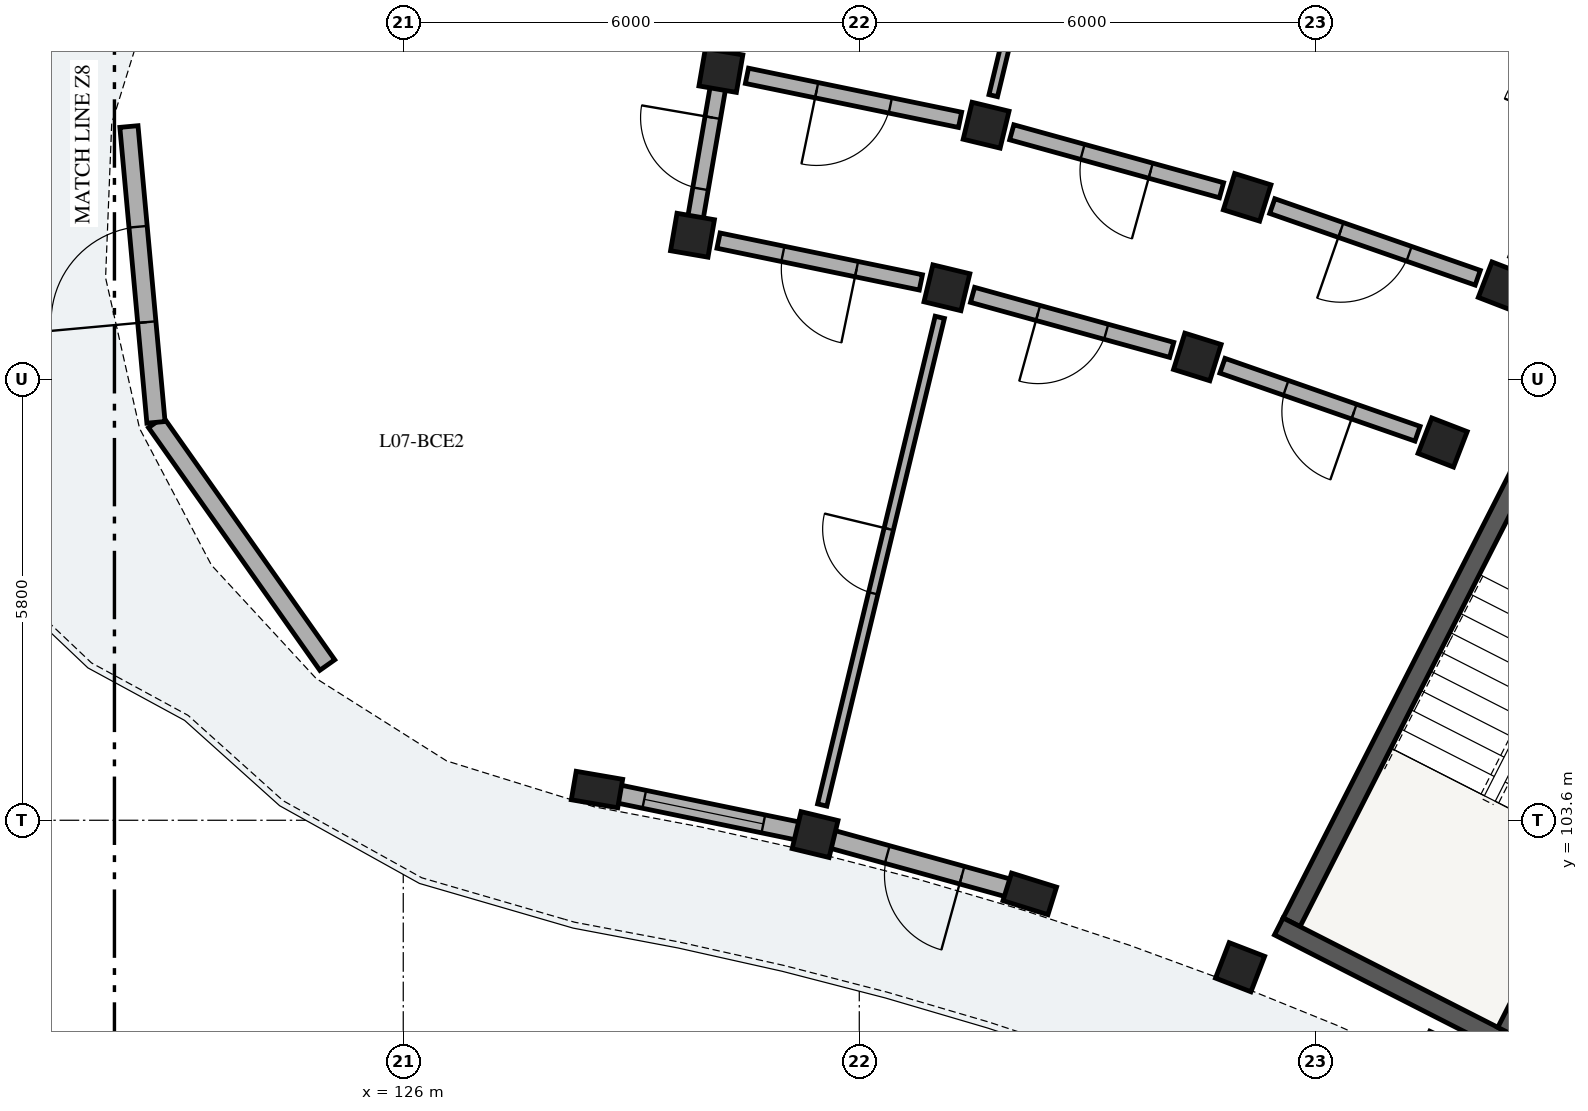
"""IFC4 building model, lengths in metres.
Left out: names, types, materials, properties, quantities, classifications, styles, units other than length and angle.
Written with IfcOpenShell. Run it as: python <this file> out.ifc"""

import sys

from ifc_helpers import new_model, si_unit, direction, frame, frame_2d, origin, origin_2d, place, context, subcontext, project, spatial, rectangle, extrude, element, fill, save


model = new_model("IFC4")
c1 = context("Model", 3, precision=1e-05, world=origin(), true_north=direction((0.0, 1.0)))
c2 = subcontext(c1, "Body", "Model", "MODEL_VIEW")
j1 = project(units=[si_unit("LENGTHUNIT", "METRE"), si_unit("PLANEANGLEUNIT", "RADIAN")], contexts=[c1])
p1 = place(None, origin())
s1 = spatial("IfcSite", under=j1, at=p1, CompositionType="ELEMENT")
p2 = place(p1, origin())
s2 = spatial("IfcBuilding", under=s1, at=p2, CompositionType="ELEMENT")
p3 = place(p2, frame((0.0, 0.0, 25.64)))
s3 = spatial("IfcBuildingStorey", under=s2, at=p3, CompositionType="ELEMENT", Elevation=25.64)
p4 = place(p3, frame((140.684, 108.139, 0.0), z_axis=(0.0, 0.0, 1.0), x_axis=(-0.453992276384, -0.891005618941, 0.0)))
e1 = element("IfcWall", 1, at=p4, inside=s3, PredefinedType="SHEAR", context=c2, shape_type="SweptSolid", body=[
    extrude(rectangle(XDim=6.6, YDim=0.25, at=frame_2d((3.3, 0.0))), origin(), (0.0, 0.0, 1.0), 3.11),
])
p5 = place(p3, frame((137.52, 102.203, 0.0), z_axis=(0.0, 0.0, 1.0), x_axis=(0.891003540237, -0.453996356025, 0.0)))
e2 = element("IfcWall", 2, at=p5, inside=s3, PredefinedType="SHEAR", context=c2, shape_type="SweptSolid", body=[
    extrude(rectangle(XDim=3.42, YDim=0.25, at=frame_2d((1.71, 0.0))), origin(), (0.0, 0.0, 1.0), 3.11),
])
p6 = place(p3, frame((143.509, 106.699, 0.0), z_axis=(0.0, 0.0, 1.0), x_axis=(-0.453992276384, -0.891005618941, 0.0)))
e3 = element("IfcWall", 3, at=p6, inside=s3, PredefinedType="SHEAR", context=c2, shape_type="SweptSolid", body=[
    extrude(rectangle(XDim=6.6, YDim=0.25, at=frame_2d((3.3, 0.0))), origin(), (0.0, 0.0, 1.0), 3.11),
])
p7 = place(p6, frame((0.22, 0.0, 0.0)))
e4 = element("IfcOpeningElement", 4, at=p7, cuts=e3, PredefinedType="OPENING", context=c2, shape_type="SweptSolid", body=[
    extrude(rectangle(XDim=1.05, YDim=2.15, at=frame_2d((0.525, 1.075))), frame((0.0, 0.135, 0.0), z_axis=(0.0, -1.0, 0.0), x_axis=(1.0, 0.0, 0.0)), (0.0, 0.0, 1.0), 0.27),
])
for number, where, z_axis, x_axis in (
    (5, (137.01, 101.667, 0.0), (0.0, 0.0, 1.0), (0.36, 0.933, 0.0)),
    (6, (139.675, 108.57, 0.0), (0.0, 0.0, 1.0), (0.36, 0.933, 0.0)),
    (7, (140.468, 110.622, 0.0), (0.0, 0.0, 1.0), (0.36, 0.933, 0.0)),
):
    element("IfcColumn", number, at=place(p3, frame(where, z_axis=z_axis, x_axis=x_axis)), inside=s3, PredefinedType="COLUMN", context=c2, shape_type="SweptSolid", body=[
        extrude(rectangle(XDim=0.5, YDim=0.5, at=origin_2d()), origin(), (0.0, 0.0, 1.0), 3.11),
    ])
p8 = place(p3, frame((134.243, 102.631, 0.0), z_axis=(0.0, 0.0, 1.0), x_axis=(0.297930225503, 0.954587649581, 0.0)))
e8 = element("IfcColumn", 8, at=p8, inside=s3, PredefinedType="PILASTER", context=c2, shape_type="SweptSolid", body=[
    extrude(rectangle(XDim=0.38, YDim=0.62, at=origin_2d()), origin(), (0.0, 0.0, 1.0), 3.11),
])
for number, where, z_axis, x_axis in (
    (9, (136.448, 109.695, 0.0), (0.0, 0.0, 1.0), (0.298, 0.955, 0.0)),
    (10, (137.103, 111.795, 0.0), (0.0, 0.0, 1.0), (0.298, 0.955, 0.0)),
    (11, (131.418, 103.412, 0.0), (0.0, 0.0, 1.0), (0.234, 0.972, 0.0)),
    (12, (133.153, 110.606, 0.0), (0.0, 0.0, 1.0), (0.234, 0.972, 0.0)),
    (13, (133.669, 112.744, 0.0), (0.0, 0.0, 1.0), (0.234, 0.972, 0.0)),
):
    element("IfcColumn", number, at=place(p3, frame(where, z_axis=z_axis, x_axis=x_axis)), inside=s3, PredefinedType="COLUMN", context=c2, shape_type="SweptSolid", body=[
        extrude(rectangle(XDim=0.5, YDim=0.5, at=origin_2d()), origin(), (0.0, 0.0, 1.0), 3.11),
    ])
p9 = place(p3, frame((128.549, 104.004, 0.0), z_axis=(0.0, 0.0, 1.0), x_axis=(0.169827230012, 0.985473851478, 0.0)))
e14 = element("IfcColumn", 14, at=p9, inside=s3, PredefinedType="PILASTER", context=c2, shape_type="SweptSolid", body=[
    extrude(rectangle(XDim=0.38, YDim=0.62, at=origin_2d()), origin(), (0.0, 0.0, 1.0), 3.11),
])
for number, where, z_axis, x_axis in (
    (15, (129.806, 111.297, 0.0), (0.0, 0.0, 1.0), (0.17, 0.985, 0.0)),
    (16, (130.179, 113.465, 0.0), (0.0, 0.0, 1.0), (0.17, 0.985, 0.0)),
):
    element("IfcColumn", number, at=place(p3, frame(where, z_axis=z_axis, x_axis=x_axis)), inside=s3, PredefinedType="COLUMN", context=c2, shape_type="SweptSolid", body=[
        extrude(rectangle(XDim=0.5, YDim=0.5, at=origin_2d()), origin(), (0.0, 0.0, 1.0), 3.11),
    ])
p10 = place(p3, frame((134.089, 102.674, 0.0), z_axis=(0.0, 0.0, 1.0), x_axis=(-0.963885917636, 0.266315485437, 0.0)))
e17 = element("IfcWall", 17, at=p10, inside=s3, PredefinedType="SOLIDWALL", context=c2, shape_type="SweptSolid", body=[
    extrude(rectangle(XDim=2.55, YDim=0.24, at=frame_2d((1.275, 0.0))), origin(), (0.0, 0.0, 1.0), 2.355),
])
p11 = place(p10, frame((0.765, 0.0, 0.0)))
e18 = element("IfcOpeningElement", 18, at=p11, cuts=e17, PredefinedType="OPENING", context=c2, shape_type="SweptSolid", body=[
    extrude(rectangle(XDim=1.02, YDim=2.14, at=frame_2d((0.51, 1.07))), frame((0.0, 0.13, 0.0), z_axis=(0.0, -1.0, 0.0), x_axis=(1.0, 0.0, 0.0)), (0.0, 0.0, 1.0), 0.26),
])
p12 = place(p3, frame((131.203, 103.456, 0.0), z_axis=(0.0, 0.0, 1.0), x_axis=(-0.979346784625, 0.202187723277, 0.0)))
e19 = element("IfcWall", 19, at=p12, inside=s3, PredefinedType="SOLIDWALL", context=c2, shape_type="SweptSolid", body=[
    extrude(rectangle(XDim=2.55, YDim=0.24, at=frame_2d((1.275, 0.0))), origin(), (0.0, 0.0, 1.0), 2.355),
])
p13 = place(p12, frame((0.475, 0.0, 0.55)))
e20 = element("IfcOpeningElement", 20, at=p13, cuts=e19, PredefinedType="OPENING", context=c2, shape_type="SweptSolid", body=[
    extrude(rectangle(XDim=1.6, YDim=1.535, at=frame_2d((0.8, 0.768))), frame((0.0, 0.13, 0.0), z_axis=(0.0, -1.0, 0.0), x_axis=(1.0, 0.0, 0.0)), (0.0, 0.0, 1.0), 0.26),
])
p14 = place(p3, frame((125.0, 105.642, 0.0), z_axis=(0.0, 0.0, 1.0), x_axis=(-0.576773939634, 0.816903802512, 0.0)))
e21 = element("IfcWall", 21, at=p14, inside=s3, PredefinedType="SOLIDWALL", context=c2, shape_type="SweptSolid", body=[
    extrude(rectangle(XDim=3.908, YDim=0.24, at=frame_2d((1.954, 0.0))), origin(), (0.0, 0.0, 1.0), 2.355),
])
p15 = place(p3, frame((122.746, 108.835, 0.0), z_axis=(0.0, 0.0, 1.0), x_axis=(-0.091020141047, 0.995849051776, 0.0)))
e22 = element("IfcWall", 22, at=p15, inside=s3, PredefinedType="SOLIDWALL", context=c2, shape_type="SweptSolid", body=[
    extrude(rectangle(XDim=3.908, YDim=0.24, at=frame_2d((1.954, 0.0))), origin(), (0.0, 0.0, 1.0), 2.355),
])
p16 = place(p15, frame((1.324, 0.0, 0.0)))
e23 = element("IfcOpeningElement", 23, at=p16, cuts=e22, PredefinedType="OPENING", context=c2, shape_type="SweptSolid", body=[
    extrude(rectangle(XDim=1.26, YDim=2.18, at=frame_2d((0.63, 1.09))), frame((0.0, 0.13, 0.0), z_axis=(0.0, -1.0, 0.0), x_axis=(1.0, 0.0, 0.0)), (0.0, 0.0, 1.0), 0.26),
])
p17 = place(p3, frame((140.137, 110.738, 0.0), z_axis=(0.0, 0.0, 1.0), x_axis=(-0.944253820929, 0.329218349522, 0.0)))
e24 = element("IfcWall", 24, at=p17, inside=s3, PredefinedType="PARTITIONING", context=c2, shape_type="SweptSolid", body=[
    extrude(rectangle(XDim=2.863, YDim=0.205, at=frame_2d((1.432, 0.0))), origin(), (0.0, 0.0, 1.0), 2.37),
])
p18 = place(p17, frame((0.957, 0.0, 0.0)))
e25 = element("IfcOpeningElement", 25, at=p18, cuts=e24, PredefinedType="OPENING", context=c2, shape_type="SweptSolid", body=[
    extrude(rectangle(XDim=0.95, YDim=2.13, at=frame_2d((0.475, 1.065))), frame((0.0, 0.113, 0.0), z_axis=(0.0, -1.0, 0.0), x_axis=(1.0, 0.0, 0.0)), (0.0, 0.0, 1.0), 0.225),
])
p19 = place(p3, frame((139.345, 108.685, 0.0), z_axis=(0.0, 0.0, 1.0), x_axis=(-0.944265123647, 0.329185929627, 0.0)))
e26 = element("IfcWall", 26, at=p19, inside=s3, PredefinedType="PARTITIONING", context=c2, shape_type="SweptSolid", body=[
    extrude(rectangle(XDim=2.718, YDim=0.205, at=frame_2d((1.359, 0.0))), origin(), (0.0, 0.0, 1.0), 2.37),
])
p20 = place(p19, frame((0.884, 0.0, 0.0)))
e27 = element("IfcOpeningElement", 27, at=p20, cuts=e26, PredefinedType="OPENING", context=c2, shape_type="SweptSolid", body=[
    extrude(rectangle(XDim=0.95, YDim=2.13, at=frame_2d((0.475, 1.065))), frame((0.0, 0.113, 0.0), z_axis=(0.0, -1.0, 0.0), x_axis=(1.0, 0.0, 0.0)), (0.0, 0.0, 1.0), 0.225),
])
p21 = place(p3, frame((136.766, 111.889, 0.0), z_axis=(0.0, 0.0, 1.0), x_axis=(-0.963890789093, 0.266297853356, 0.0)))
e28 = element("IfcWall", 28, at=p21, inside=s3, PredefinedType="PARTITIONING", context=c2, shape_type="SweptSolid", body=[
    extrude(rectangle(XDim=2.863, YDim=0.205, at=frame_2d((1.432, 0.0))), origin(), (0.0, 0.0, 1.0), 2.37),
])
p22 = place(p21, frame((0.967, 0.0, 0.0)))
e29 = element("IfcOpeningElement", 29, at=p22, cuts=e28, PredefinedType="OPENING", context=c2, shape_type="SweptSolid", body=[
    extrude(rectangle(XDim=0.93, YDim=2.12, at=frame_2d((0.465, 1.06))), frame((0.0, 0.113, 0.0), z_axis=(0.0, -1.0, 0.0), x_axis=(1.0, 0.0, 0.0)), (0.0, 0.0, 1.0), 0.225),
])
p23 = place(p3, frame((136.11, 109.789, 0.0), z_axis=(0.0, 0.0, 1.0), x_axis=(-0.96388375821, 0.266323301006, 0.0)))
e30 = element("IfcWall", 30, at=p23, inside=s3, PredefinedType="PARTITIONING", context=c2, shape_type="SweptSolid", body=[
    extrude(rectangle(XDim=2.718, YDim=0.205, at=frame_2d((1.359, 0.0))), origin(), (0.0, 0.0, 1.0), 2.37),
])
p24 = place(p23, frame((0.894, 0.0, 0.0)))
e31 = element("IfcOpeningElement", 31, at=p24, cuts=e30, PredefinedType="OPENING", context=c2, shape_type="SweptSolid", body=[
    extrude(rectangle(XDim=0.93, YDim=2.12, at=frame_2d((0.465, 1.06))), frame((0.0, 0.113, 0.0), z_axis=(0.0, -1.0, 0.0), x_axis=(1.0, 0.0, 0.0)), (0.0, 0.0, 1.0), 0.225),
])
p25 = place(p3, frame((133.762, 113.133, 0.0), z_axis=(0.0, 0.0, 1.0), x_axis=(0.234386624934, 0.972143461662, 0.0)))
e32 = element("IfcWall", 32, at=p25, inside=s3, PredefinedType="PARTITIONING", context=c2, shape_type="SweptSolid", body=[
    extrude(rectangle(XDim=4.7, YDim=0.115, at=frame_2d((2.35, 0.0))), origin(), (0.0, 0.0, 1.0), 2.37),
])
p26 = place(p25, frame((1.905, 0.0, 0.0)))
e33 = element("IfcOpeningElement", 33, at=p26, cuts=e32, PredefinedType="OPENING", context=c2, shape_type="SweptSolid", body=[
    extrude(rectangle(XDim=0.89, YDim=2.1, at=frame_2d((0.445, 1.05))), frame((0.0, 0.067, 0.0), z_axis=(0.0, -1.0, 0.0), x_axis=(1.0, 0.0, 0.0)), (0.0, 0.0, 1.0), 0.135),
])
p27 = place(p3, frame((131.512, 103.801, 0.0), z_axis=(0.0, 0.0, 1.0), x_axis=(0.234406698576, 0.972138621629, 0.0)))
e34 = element("IfcWall", 34, at=p27, inside=s3, PredefinedType="PARTITIONING", context=c2, shape_type="SweptSolid", body=[
    extrude(rectangle(XDim=6.6, YDim=0.125, at=frame_2d((3.3, 0.0))), origin(), (0.0, 0.0, 1.0), 2.37),
])
p28 = place(p27, frame((2.865, 0.0, 0.0)))
e35 = element("IfcOpeningElement", 35, at=p28, cuts=e34, PredefinedType="OPENING", context=c2, shape_type="SweptSolid", body=[
    extrude(rectangle(XDim=0.87, YDim=2.08, at=frame_2d((0.435, 1.04))), frame((0.0, 0.073, 0.0), z_axis=(0.0, -1.0, 0.0), x_axis=(1.0, 0.0, 0.0)), (0.0, 0.0, 1.0), 0.145),
])
p29 = place(p3, frame((133.326, 112.815, 0.0), z_axis=(0.0, 0.0, 1.0), x_axis=(-0.979348418612, 0.202179808492, 0.0)))
e36 = element("IfcWall", 36, at=p29, inside=s3, PredefinedType="PARTITIONING", context=c2, shape_type="SweptSolid", body=[
    extrude(rectangle(XDim=2.863, YDim=0.205, at=frame_2d((1.432, 0.0))), origin(), (0.0, 0.0, 1.0), 2.37),
])
p30 = place(p29, frame((0.937, 0.0, 0.0)))
e37 = element("IfcOpeningElement", 37, at=p30, cuts=e36, PredefinedType="OPENING", context=c2, shape_type="SweptSolid", body=[
    extrude(rectangle(XDim=0.99, YDim=2.16, at=frame_2d((0.495, 1.08))), frame((0.0, 0.113, 0.0), z_axis=(0.0, -1.0, 0.0), x_axis=(1.0, 0.0, 0.0)), (0.0, 0.0, 1.0), 0.225),
])
p31 = place(p3, frame((132.81, 110.677, 0.0), z_axis=(0.0, 0.0, 1.0), x_axis=(-0.979349423541, 0.202174940608, 0.0)))
e38 = element("IfcWall", 38, at=p31, inside=s3, PredefinedType="PARTITIONING", context=c2, shape_type="SweptSolid", body=[
    extrude(rectangle(XDim=2.718, YDim=0.205, at=frame_2d((1.359, 0.0))), origin(), (0.0, 0.0, 1.0), 2.37),
])
p32 = place(p31, frame((0.864, 0.0, 0.0)))
e39 = element("IfcOpeningElement", 39, at=p32, cuts=e38, PredefinedType="OPENING", context=c2, shape_type="SweptSolid", body=[
    extrude(rectangle(XDim=0.99, YDim=2.16, at=frame_2d((0.495, 1.08))), frame((0.0, 0.113, 0.0), z_axis=(0.0, -1.0, 0.0), x_axis=(1.0, 0.0, 0.0)), (0.0, 0.0, 1.0), 0.225),
])
p33 = place(p3, frame((129.814, 111.346, 0.0), z_axis=(0.0, 0.0, 1.0), x_axis=(0.169864088707, 0.98546749889, 0.0)))
e40 = element("IfcWall", 40, at=p33, inside=s3, PredefinedType="PARTITIONING", context=c2, shape_type="SweptSolid", body=[
    extrude(rectangle(XDim=2.1, YDim=0.205, at=frame_2d((1.05, 0.0))), origin(), (0.0, 0.0, 1.0), 2.37),
])
p34 = place(p33, frame((0.57, 0.0, 0.0)))
e41 = element("IfcOpeningElement", 41, at=p34, cuts=e40, PredefinedType="OPENING", context=c2, shape_type="SweptSolid", body=[
    extrude(rectangle(XDim=0.95, YDim=2.13, at=frame_2d((0.475, 1.065))), frame((0.0, 0.113, 0.0), z_axis=(0.0, -1.0, 0.0), x_axis=(1.0, 0.0, 0.0)), (0.0, 0.0, 1.0), 0.225),
])
p35 = place(p11, origin())
e42 = element("IfcDoor", 42, at=p35, inside=s3, OperationType="SINGLE_SWING_LEFT", PredefinedType="DOOR", context=c2, shape_type="SweptSolid", body=[
    extrude(rectangle(XDim=1.02, YDim=2.14, at=frame_2d((0.51, 1.07))), frame((0.0, 0.025, 0.0), z_axis=(0.0, -1.0, 0.0), x_axis=(1.0, 0.0, 0.0)), (0.0, 0.0, 1.0), 0.05),
])
fill(e18, e42)
p36 = place(p13, origin())
e43 = element("IfcWindow", 43, at=p36, inside=s3, PartitioningType="SINGLE_PANEL", PredefinedType="WINDOW", context=c2, shape_type="SweptSolid", body=[
    extrude(rectangle(XDim=1.6, YDim=1.535, at=frame_2d((0.8, 0.768))), frame((0.0, 0.03, 0.0), z_axis=(0.0, -1.0, 0.0), x_axis=(1.0, 0.0, 0.0)), (0.0, 0.0, 1.0), 0.06),
])
fill(e20, e43)
p37 = place(p16, origin())
e44 = element("IfcDoor", 44, at=p37, inside=s3, OperationType="SINGLE_SWING_LEFT", PredefinedType="DOOR", context=c2, shape_type="SweptSolid", body=[
    extrude(rectangle(XDim=1.26, YDim=2.18, at=frame_2d((0.63, 1.09))), frame((0.0, 0.025, 0.0), z_axis=(0.0, -1.0, 0.0), x_axis=(1.0, 0.0, 0.0)), (0.0, 0.0, 1.0), 0.05),
])
fill(e23, e44)
p38 = place(p18, origin())
e45 = element("IfcDoor", 45, at=p38, inside=s3, OperationType="SINGLE_SWING_RIGHT", PredefinedType="DOOR", context=c2, shape_type="SweptSolid", body=[
    extrude(rectangle(XDim=0.95, YDim=2.13, at=frame_2d((0.475, 1.065))), frame((0.0, 0.025, 0.0), z_axis=(0.0, -1.0, 0.0), x_axis=(1.0, 0.0, 0.0)), (0.0, 0.0, 1.0), 0.05),
])
fill(e25, e45)
p39 = place(p20, origin())
e46 = element("IfcDoor", 46, at=p39, inside=s3, OperationType="SINGLE_SWING_LEFT", PredefinedType="DOOR", context=c2, shape_type="SweptSolid", body=[
    extrude(rectangle(XDim=0.95, YDim=2.13, at=frame_2d((0.475, 1.065))), frame((0.0, 0.025, 0.0), z_axis=(0.0, -1.0, 0.0), x_axis=(1.0, 0.0, 0.0)), (0.0, 0.0, 1.0), 0.05),
])
fill(e27, e46)
p40 = place(p22, origin())
e47 = element("IfcDoor", 47, at=p40, inside=s3, OperationType="SINGLE_SWING_LEFT", PredefinedType="DOOR", context=c2, shape_type="SweptSolid", body=[
    extrude(rectangle(XDim=0.93, YDim=2.12, at=frame_2d((0.465, 1.06))), frame((0.0, 0.025, 0.0), z_axis=(0.0, -1.0, 0.0), x_axis=(1.0, 0.0, 0.0)), (0.0, 0.0, 1.0), 0.05),
])
fill(e29, e47)
p41 = place(p24, origin())
e48 = element("IfcDoor", 48, at=p41, inside=s3, OperationType="SINGLE_SWING_RIGHT", PredefinedType="DOOR", context=c2, shape_type="SweptSolid", body=[
    extrude(rectangle(XDim=0.93, YDim=2.12, at=frame_2d((0.465, 1.06))), frame((0.0, 0.025, 0.0), z_axis=(0.0, -1.0, 0.0), x_axis=(1.0, 0.0, 0.0)), (0.0, 0.0, 1.0), 0.05),
])
fill(e31, e48)
p42 = place(p28, origin())
e49 = element("IfcDoor", 49, at=p42, inside=s3, OperationType="SINGLE_SWING_RIGHT", PredefinedType="DOOR", context=c2, shape_type="SweptSolid", body=[
    extrude(rectangle(XDim=0.87, YDim=2.08, at=frame_2d((0.435, 1.04))), frame((0.0, 0.025, 0.0), z_axis=(0.0, -1.0, 0.0), x_axis=(1.0, 0.0, 0.0)), (0.0, 0.0, 1.0), 0.05),
])
fill(e35, e49)
p43 = place(p30, origin())
e50 = element("IfcDoor", 50, at=p43, inside=s3, OperationType="SINGLE_SWING_RIGHT", PredefinedType="DOOR", context=c2, shape_type="SweptSolid", body=[
    extrude(rectangle(XDim=0.99, YDim=2.16, at=frame_2d((0.495, 1.08))), frame((0.0, 0.025, 0.0), z_axis=(0.0, -1.0, 0.0), x_axis=(1.0, 0.0, 0.0)), (0.0, 0.0, 1.0), 0.05),
])
fill(e37, e50)
p44 = place(p32, origin())
e51 = element("IfcDoor", 51, at=p44, inside=s3, OperationType="SINGLE_SWING_LEFT", PredefinedType="DOOR", context=c2, shape_type="SweptSolid", body=[
    extrude(rectangle(XDim=0.99, YDim=2.16, at=frame_2d((0.495, 1.08))), frame((0.0, 0.025, 0.0), z_axis=(0.0, -1.0, 0.0), x_axis=(1.0, 0.0, 0.0)), (0.0, 0.0, 1.0), 0.05),
])
fill(e39, e51)
p45 = place(p34, origin())
e52 = element("IfcDoor", 52, at=p45, inside=s3, OperationType="SINGLE_SWING_RIGHT", PredefinedType="DOOR", context=c2, shape_type="SweptSolid", body=[
    extrude(rectangle(XDim=0.95, YDim=2.13, at=frame_2d((0.475, 1.065))), frame((0.0, 0.025, 0.0), z_axis=(0.0, -1.0, 0.0), x_axis=(1.0, 0.0, 0.0)), (0.0, 0.0, 1.0), 0.05),
])
fill(e41, e52)
save(model, sys.argv[1])
